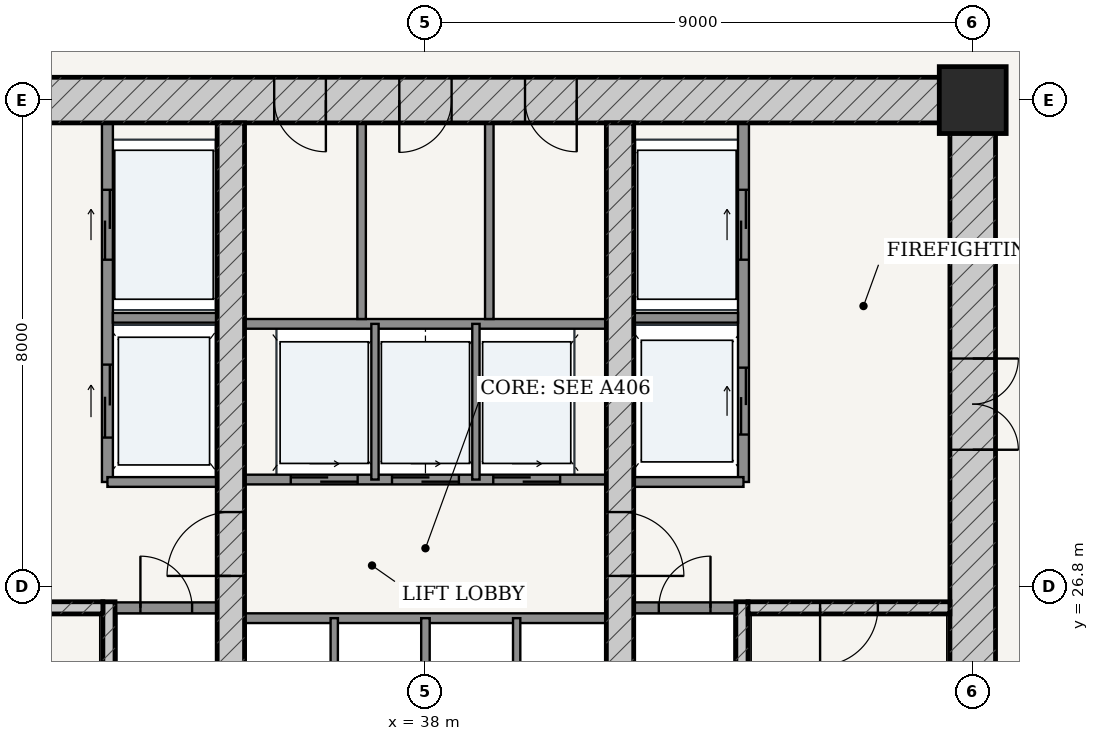
"""IFC4 building model, lengths in metres.
Left out: names, types, materials, properties, quantities, classifications, styles, units other than length and angle.
Written with IfcOpenShell. Run it as: python <this file> out.ifc"""

import sys

from ifc_helpers import new_model, si_unit, direction, frame, frame_2d, origin, origin_2d, place, context, subcontext, project, spatial, rectangle, extrude, source, transform, mapped, element, fill, save


model = new_model("IFC4")
c1 = context("Model", 3, precision=1e-05, world=origin(), true_north=direction((-0.2419218956, 0.970295726276)))
c2 = subcontext(c1, "Body", "Model", "MODEL_VIEW")
j1 = project(units=[si_unit("LENGTHUNIT", "METRE"), si_unit("PLANEANGLEUNIT", "RADIAN")], contexts=[c1])
p1 = place(None, origin())
s1 = spatial("IfcSite", under=j1, at=p1, CompositionType="ELEMENT")
p2 = place(p1, origin())
s2 = spatial("IfcBuilding", under=s1, at=p2, CompositionType="ELEMENT")
p3 = place(p2, frame((0.0, 0.0, 14.4)))
s3 = spatial("IfcBuildingStorey", under=s2, at=p3, CompositionType="ELEMENT", Elevation=14.4)
p4 = place(p3, frame((47.0, 34.8, 0.0), z_axis=(0.0, 0.0, 1.0), x_axis=(1.0, 0.0, 0.0)))
e1 = element("IfcColumn", 1, at=p4, inside=s3, PredefinedType="COLUMN", context=c2, shape_type="SweptSolid", body=[
    extrude(rectangle(XDim=1.1, YDim=1.1, at=origin_2d()), origin(), (0.0, 0.0, 1.0), 4.5),
])
p5 = place(p3, frame((28.625, 34.8, 0.0), z_axis=(0.0, 0.0, 1.0), x_axis=(1.0, 0.0, 0.0)))
e2 = element("IfcWall", 2, at=p5, inside=s3, PredefinedType="SHEAR", context=c2, shape_type="SweptSolid", body=[
    extrude(rectangle(XDim=18.75, YDim=0.75, at=frame_2d((9.375, 0.0))), origin(), (0.0, 0.0, 1.0), 4.05),
])
p6 = place(p5, frame((6.887, 0.0, 0.0)))
e3 = element("IfcOpeningElement", 3, at=p6, cuts=e2, PredefinedType="OPENING", context=c2, shape_type="SweptSolid", body=[
    extrude(rectangle(XDim=0.85, YDim=2.1, at=frame_2d((0.425, 1.05))), frame((0.0, 0.385, 0.0), z_axis=(0.0, -1.0, 0.0), x_axis=(1.0, 0.0, 0.0)), (0.0, 0.0, 1.0), 0.77),
])
p7 = place(p5, frame((8.945, 0.0, 0.0)))
e4 = element("IfcOpeningElement", 4, at=p7, cuts=e2, PredefinedType="OPENING", context=c2, shape_type="SweptSolid", body=[
    extrude(rectangle(XDim=0.86, YDim=2.1, at=frame_2d((0.43, 1.05))), frame((0.0, 0.385, 0.0), z_axis=(0.0, -1.0, 0.0), x_axis=(1.0, 0.0, 0.0)), (0.0, 0.0, 1.0), 0.77),
])
p8 = place(p5, frame((11.012, 0.0, 0.0)))
e5 = element("IfcOpeningElement", 5, at=p8, cuts=e2, PredefinedType="OPENING", context=c2, shape_type="SweptSolid", body=[
    extrude(rectangle(XDim=0.85, YDim=2.1, at=frame_2d((0.425, 1.05))), frame((0.0, 0.385, 0.0), z_axis=(0.0, -1.0, 0.0), x_axis=(1.0, 0.0, 0.0)), (0.0, 0.0, 1.0), 0.77),
])
p9 = place(p3, frame((47.0, 19.175, 0.0), z_axis=(0.0, 0.0, 1.0), x_axis=(0.0, 1.0, 0.0)))
e6 = element("IfcWall", 6, at=p9, inside=s3, PredefinedType="SHEAR", context=c2, shape_type="SweptSolid", body=[
    extrude(rectangle(XDim=15.25, YDim=0.75, at=frame_2d((7.625, 0.0))), origin(), (0.0, 0.0, 1.0), 4.05),
])
p10 = place(p9, frame((9.875, 0.0, 0.0)))
e7 = element("IfcOpeningElement", 7, at=p10, cuts=e6, PredefinedType="OPENING", context=c2, shape_type="SweptSolid", body=[
    extrude(rectangle(XDim=1.5, YDim=2.2, at=frame_2d((0.75, 1.1))), frame((0.0, 0.385, 0.0), z_axis=(0.0, -1.0, 0.0), x_axis=(1.0, 0.0, 0.0)), (0.0, 0.0, 1.0), 0.77),
])
p11 = place(p3, frame((32.795, 19.175, 0.0), z_axis=(0.0, 0.0, 1.0), x_axis=(0.0, 1.0, 0.0)))
e8 = element("IfcWall", 8, at=p11, inside=s3, PredefinedType="SOLIDWALL", context=c2, shape_type="SweptSolid", body=[
    extrude(rectangle(XDim=7.375, YDim=0.2, at=frame_2d((3.688, 0.0))), origin(), (0.0, 0.0, 1.0), 4.05),
])
p12 = place(p3, frame((29.375, 26.45, 0.0), z_axis=(0.0, 0.0, 1.0), x_axis=(1.0, 0.0, 0.0)))
e9 = element("IfcWall", 9, at=p12, inside=s3, PredefinedType="SOLIDWALL", context=c2, shape_type="SweptSolid", body=[
    extrude(rectangle(XDim=3.32, YDim=0.2, at=frame_2d((1.66, 0.0))), origin(), (0.0, 0.0, 1.0), 4.05),
])
p13 = place(p12, frame((1.185, 0.0, 0.0)))
e10 = element("IfcOpeningElement", 10, at=p13, cuts=e9, PredefinedType="OPENING", context=c2, shape_type="SweptSolid", body=[
    extrude(rectangle(XDim=0.95, YDim=2.15, at=frame_2d((0.475, 1.075))), frame((0.0, 0.11, 0.0), z_axis=(0.0, -1.0, 0.0), x_axis=(1.0, 0.0, 0.0)), (0.0, 0.0, 1.0), 0.22),
])
p14 = place(p3, frame((43.205, 19.175, 0.0), z_axis=(0.0, 0.0, 1.0), x_axis=(0.0, 1.0, 0.0)))
e11 = element("IfcWall", 11, at=p14, inside=s3, PredefinedType="SOLIDWALL", context=c2, shape_type="SweptSolid", body=[
    extrude(rectangle(XDim=7.375, YDim=0.2, at=frame_2d((3.688, 0.0))), origin(), (0.0, 0.0, 1.0), 4.05),
])
p15 = place(p3, frame((43.305, 26.45, 0.0), z_axis=(0.0, 0.0, 1.0), x_axis=(1.0, 0.0, 0.0)))
e12 = element("IfcWall", 12, at=p15, inside=s3, PredefinedType="SOLIDWALL", context=c2, shape_type="SweptSolid", body=[
    extrude(rectangle(XDim=3.32, YDim=0.2, at=frame_2d((1.66, 0.0))), origin(), (0.0, 0.0, 1.0), 4.05),
])
p16 = place(p15, frame((1.185, 0.0, 0.0)))
e13 = element("IfcOpeningElement", 13, at=p16, cuts=e12, PredefinedType="OPENING", context=c2, shape_type="SweptSolid", body=[
    extrude(rectangle(XDim=0.95, YDim=2.15, at=frame_2d((0.475, 1.075))), frame((0.0, 0.11, 0.0), z_axis=(0.0, -1.0, 0.0), x_axis=(1.0, 0.0, 0.0)), (0.0, 0.0, 1.0), 0.22),
])
p17 = place(p3, frame((34.8, 19.175, 0.0), z_axis=(0.0, 0.0, 1.0), x_axis=(0.0, 1.0, 0.0)))
e14 = element("IfcWall", 14, at=p17, inside=s3, PredefinedType="SHEAR", context=c2, shape_type="SweptSolid", body=[
    extrude(rectangle(XDim=15.25, YDim=0.45, at=frame_2d((7.625, 0.0))), origin(), (0.0, 0.0, 1.0), 4.05),
])
p18 = place(p17, frame((7.8, 0.0, 0.0)))
e15 = element("IfcOpeningElement", 15, at=p18, cuts=e14, PredefinedType="OPENING", context=c2, shape_type="SweptSolid", body=[
    extrude(rectangle(XDim=1.05, YDim=2.15, at=frame_2d((0.525, 1.075))), frame((0.0, 0.235, 0.0), z_axis=(0.0, -1.0, 0.0), x_axis=(1.0, 0.0, 0.0)), (0.0, 0.0, 1.0), 0.47),
])
p19 = place(p3, frame((41.2, 19.175, 0.0), z_axis=(0.0, 0.0, 1.0), x_axis=(0.0, 1.0, 0.0)))
e16 = element("IfcWall", 16, at=p19, inside=s3, PredefinedType="SHEAR", context=c2, shape_type="SweptSolid", body=[
    extrude(rectangle(XDim=15.25, YDim=0.45, at=frame_2d((7.625, 0.0))), origin(), (0.0, 0.0, 1.0), 4.05),
])
p20 = place(p19, frame((7.8, 0.0, 0.0)))
e17 = element("IfcOpeningElement", 17, at=p20, cuts=e16, PredefinedType="OPENING", context=c2, shape_type="SweptSolid", body=[
    extrude(rectangle(XDim=1.05, YDim=2.15, at=frame_2d((0.525, 1.075))), frame((0.0, 0.235, 0.0), z_axis=(0.0, -1.0, 0.0), x_axis=(1.0, 0.0, 0.0)), (0.0, 0.0, 1.0), 0.47),
])
p21 = place(p3, frame((32.9, 26.45, 0.0), z_axis=(0.0, 0.0, 1.0), x_axis=(1.0, 0.0, 0.0)))
e18 = element("IfcWall", 18, at=p21, inside=s3, PredefinedType="PARTITIONING", context=c2, shape_type="SweptSolid", body=[
    extrude(rectangle(XDim=1.675, YDim=0.18, at=frame_2d((0.837, 0.0))), origin(), (0.0, 0.0, 1.0), 4.05),
])
p22 = place(p21, frame((0.413, 0.0, 0.0)))
e19 = element("IfcOpeningElement", 19, at=p22, cuts=e18, PredefinedType="OPENING", context=c2, shape_type="SweptSolid", body=[
    extrude(rectangle(XDim=0.85, YDim=2.1, at=frame_2d((0.425, 1.05))), frame((0.0, 0.1, 0.0), z_axis=(0.0, -1.0, 0.0), x_axis=(1.0, 0.0, 0.0)), (0.0, 0.0, 1.0), 0.2),
])
p23 = place(p3, frame((41.425, 26.45, 0.0), z_axis=(0.0, 0.0, 1.0), x_axis=(1.0, 0.0, 0.0)))
e20 = element("IfcWall", 20, at=p23, inside=s3, PredefinedType="PARTITIONING", context=c2, shape_type="SweptSolid", body=[
    extrude(rectangle(XDim=1.675, YDim=0.18, at=frame_2d((0.837, 0.0))), origin(), (0.0, 0.0, 1.0), 4.05),
])
p24 = place(p23, frame((0.413, 0.0, 0.0)))
e21 = element("IfcOpeningElement", 21, at=p24, cuts=e20, PredefinedType="OPENING", context=c2, shape_type="SweptSolid", body=[
    extrude(rectangle(XDim=0.85, YDim=2.1, at=frame_2d((0.425, 1.05))), frame((0.0, 0.1, 0.0), z_axis=(0.0, -1.0, 0.0), x_axis=(1.0, 0.0, 0.0)), (0.0, 0.0, 1.0), 0.2),
])
p25 = place(p3, frame((32.77, 28.52, 0.0), z_axis=(0.0, 0.0, 1.0), x_axis=(0.0, 1.0, 0.0)))
e22 = element("IfcWall", 22, at=p25, inside=s3, PredefinedType="PARTITIONING", context=c2, shape_type="SweptSolid", body=[
    extrude(rectangle(XDim=5.905, YDim=0.18, at=frame_2d((2.953, 0.0))), origin(), (0.0, 0.0, 1.0), 4.05),
])
p26 = place(p25, frame((3.655, 0.0, 0.0)))
e23 = element("IfcOpeningElement", 23, at=p26, cuts=e22, PredefinedType="OPENING", context=c2, shape_type="SweptSolid", body=[
    extrude(rectangle(XDim=1.15, YDim=2.2, at=frame_2d((0.575, 1.1))), frame((0.0, 0.1, 0.0), z_axis=(0.0, -1.0, 0.0), x_axis=(1.0, 0.0, 0.0)), (0.0, 0.0, 1.0), 0.2),
])
p27 = place(p25, frame((0.73, 0.0, 0.0)))
e24 = element("IfcOpeningElement", 24, at=p27, cuts=e22, PredefinedType="OPENING", context=c2, shape_type="SweptSolid", body=[
    extrude(rectangle(XDim=1.2, YDim=2.25, at=frame_2d((0.6, 1.125))), frame((0.0, 0.1, 0.0), z_axis=(0.0, -1.0, 0.0), x_axis=(1.0, 0.0, 0.0)), (0.0, 0.0, 1.0), 0.2),
])
p28 = place(p3, frame((32.86, 31.22, 0.0), z_axis=(0.0, 0.0, 1.0), x_axis=(1.0, 0.0, 0.0)))
e25 = element("IfcWall", 25, at=p28, inside=s3, PredefinedType="PARTITIONING", context=c2, shape_type="SweptSolid", body=[
    extrude(rectangle(XDim=1.715, YDim=0.16, at=frame_2d((0.857, 0.0))), origin(), (0.0, 0.0, 1.0), 4.05),
])
p29 = place(p3, frame((32.77, 28.52, 0.0), z_axis=(0.0, 0.0, 1.0), x_axis=(1.0, 0.0, 0.0)))
e26 = element("IfcWall", 26, at=p29, inside=s3, PredefinedType="PARTITIONING", context=c2, shape_type="SweptSolid", body=[
    extrude(rectangle(XDim=1.805, YDim=0.16, at=frame_2d((0.902, 0.0))), origin(), (0.0, 0.0, 1.0), 4.05),
])
p30 = place(p3, frame((43.23, 28.52, 0.0), z_axis=(0.0, 0.0, 1.0), x_axis=(0.0, 1.0, 0.0)))
e27 = element("IfcWall", 27, at=p30, inside=s3, PredefinedType="PARTITIONING", context=c2, shape_type="SweptSolid", body=[
    extrude(rectangle(XDim=5.905, YDim=0.18, at=frame_2d((2.953, 0.0))), origin(), (0.0, 0.0, 1.0), 4.05),
])
p31 = place(p30, frame((3.655, 0.0, 0.0)))
e28 = element("IfcOpeningElement", 28, at=p31, cuts=e27, PredefinedType="OPENING", context=c2, shape_type="SweptSolid", body=[
    extrude(rectangle(XDim=1.15, YDim=2.2, at=frame_2d((0.575, 1.1))), frame((0.0, 0.1, 0.0), z_axis=(0.0, -1.0, 0.0), x_axis=(1.0, 0.0, 0.0)), (0.0, 0.0, 1.0), 0.2),
])
p32 = place(p30, frame((0.78, 0.0, 0.0)))
e29 = element("IfcOpeningElement", 29, at=p32, cuts=e27, PredefinedType="OPENING", context=c2, shape_type="SweptSolid", body=[
    extrude(rectangle(XDim=1.1, YDim=2.2, at=frame_2d((0.55, 1.1))), frame((0.0, 0.1, 0.0), z_axis=(0.0, -1.0, 0.0), x_axis=(1.0, 0.0, 0.0)), (0.0, 0.0, 1.0), 0.2),
])
p33 = place(p3, frame((41.425, 31.22, 0.0), z_axis=(0.0, 0.0, 1.0), x_axis=(1.0, 0.0, 0.0)))
e30 = element("IfcWall", 30, at=p33, inside=s3, PredefinedType="PARTITIONING", context=c2, shape_type="SweptSolid", body=[
    extrude(rectangle(XDim=1.715, YDim=0.16, at=frame_2d((0.857, 0.0))), origin(), (0.0, 0.0, 1.0), 4.05),
])
p34 = place(p3, frame((41.425, 28.52, 0.0), z_axis=(0.0, 0.0, 1.0), x_axis=(1.0, 0.0, 0.0)))
e31 = element("IfcWall", 31, at=p34, inside=s3, PredefinedType="PARTITIONING", context=c2, shape_type="SweptSolid", body=[
    extrude(rectangle(XDim=1.805, YDim=0.16, at=frame_2d((0.902, 0.0))), origin(), (0.0, 0.0, 1.0), 4.05),
])
p35 = place(p3, frame((35.025, 28.56, 0.0), z_axis=(0.0, 0.0, 1.0), x_axis=(1.0, 0.0, 0.0)))
e32 = element("IfcWall", 32, at=p35, inside=s3, PredefinedType="PARTITIONING", context=c2, shape_type="SweptSolid", body=[
    extrude(rectangle(XDim=5.95, YDim=0.16, at=frame_2d((2.975, 0.0))), origin(), (0.0, 0.0, 1.0), 4.05),
])
p36 = place(p35, frame((0.76, 0.0, 0.0)))
e33 = element("IfcOpeningElement", 33, at=p36, cuts=e32, PredefinedType="OPENING", context=c2, shape_type="SweptSolid", body=[
    extrude(rectangle(XDim=1.1, YDim=2.2, at=frame_2d((0.55, 1.1))), frame((0.0, 0.09, 0.0), z_axis=(0.0, -1.0, 0.0), x_axis=(1.0, 0.0, 0.0)), (0.0, 0.0, 1.0), 0.18),
])
p37 = place(p35, frame((2.425, 0.0, 0.0)))
e34 = element("IfcOpeningElement", 34, at=p37, cuts=e32, PredefinedType="OPENING", context=c2, shape_type="SweptSolid", body=[
    extrude(rectangle(XDim=1.1, YDim=2.2, at=frame_2d((0.55, 1.1))), frame((0.0, 0.09, 0.0), z_axis=(0.0, -1.0, 0.0), x_axis=(1.0, 0.0, 0.0)), (0.0, 0.0, 1.0), 0.18),
])
p38 = place(p35, frame((4.09, 0.0, 0.0)))
e35 = element("IfcOpeningElement", 35, at=p38, cuts=e32, PredefinedType="OPENING", context=c2, shape_type="SweptSolid", body=[
    extrude(rectangle(XDim=1.1, YDim=2.2, at=frame_2d((0.55, 1.1))), frame((0.0, 0.09, 0.0), z_axis=(0.0, -1.0, 0.0), x_axis=(1.0, 0.0, 0.0)), (0.0, 0.0, 1.0), 0.18),
])
p39 = place(p3, frame((35.025, 31.12, 0.0), z_axis=(0.0, 0.0, 1.0), x_axis=(1.0, 0.0, 0.0)))
e36 = element("IfcWall", 36, at=p39, inside=s3, PredefinedType="PARTITIONING", context=c2, shape_type="SweptSolid", body=[
    extrude(rectangle(XDim=5.95, YDim=0.16, at=frame_2d((2.975, 0.0))), origin(), (0.0, 0.0, 1.0), 4.05),
])
for number, where, z_axis, x_axis in (
    (37, (37.17, 28.56, 0.0), (0.0, 0.0, 1.0), (0.0, 1.0, 0.0)),
    (38, (38.83, 28.56, 0.0), (0.0, 0.0, 1.0), (0.0, 1.0, 0.0)),
):
    element("IfcWall", number, at=place(p3, frame(where, z_axis=z_axis, x_axis=x_axis)), inside=s3, PredefinedType="PARTITIONING", context=c2, shape_type="SweptSolid", body=[
        extrude(rectangle(XDim=2.56, YDim=0.12, at=frame_2d((1.28, 0.0))), origin(), (0.0, 0.0, 1.0), 4.05),
    ])
for number, where, z_axis, x_axis in (
    (39, (36.95, 31.2, 0.0), (0.0, 0.0, 1.0), (0.0, 1.0, 0.0)),
    (40, (39.05, 31.2, 0.0), (0.0, 0.0, 1.0), (0.0, 1.0, 0.0)),
):
    element("IfcWall", number, at=place(p3, frame(where, z_axis=z_axis, x_axis=x_axis)), inside=s3, PredefinedType="PARTITIONING", context=c2, shape_type="SweptSolid", body=[
        extrude(rectangle(XDim=3.225, YDim=0.14, at=frame_2d((1.613, 0.0))), origin(), (0.0, 0.0, 1.0), 4.05),
    ])
p40 = place(p3, frame((35.025, 26.28, 0.0), z_axis=(0.0, 0.0, 1.0), x_axis=(1.0, 0.0, 0.0)))
e41 = element("IfcWall", 41, at=p40, inside=s3, PredefinedType="PARTITIONING", context=c2, shape_type="SweptSolid", body=[
    extrude(rectangle(XDim=5.95, YDim=0.16, at=frame_2d((2.975, 0.0))), origin(), (0.0, 0.0, 1.0), 4.05),
])
p41 = place(p3, frame((36.5, 23.72, 0.0), z_axis=(0.0, 0.0, 1.0), x_axis=(0.0, 1.0, 0.0)))
e42 = element("IfcWall", 42, at=p41, inside=s3, PredefinedType="PARTITIONING", context=c2, shape_type="SweptSolid", body=[
    extrude(rectangle(XDim=2.56, YDim=0.12, at=frame_2d((1.28, 0.0))), origin(), (0.0, 0.0, 1.0), 4.05),
])
p42 = place(p3, frame((38.0, 23.72, 0.0), z_axis=(0.0, 0.0, 1.0), x_axis=(0.0, 1.0, 0.0)))
e43 = element("IfcWall", 43, at=p42, inside=s3, PredefinedType="PARTITIONING", context=c2, shape_type="SweptSolid", body=[
    extrude(rectangle(XDim=2.56, YDim=0.14, at=frame_2d((1.28, 0.0))), origin(), (0.0, 0.0, 1.0), 4.05),
])
p43 = place(p3, frame((39.5, 23.72, 0.0), z_axis=(0.0, 0.0, 1.0), x_axis=(0.0, 1.0, 0.0)))
e44 = element("IfcWall", 44, at=p43, inside=s3, PredefinedType="PARTITIONING", context=c2, shape_type="SweptSolid", body=[
    extrude(rectangle(XDim=2.56, YDim=0.12, at=frame_2d((1.28, 0.0))), origin(), (0.0, 0.0, 1.0), 4.05),
])
m1 = source(origin(), c2, "Body", "SweptSolid", [
    extrude(rectangle(XDim=1.5, YDim=2.2, at=frame_2d((0.75, 1.1))), frame((0.0, 0.025, 0.0), z_axis=(0.0, -1.0, 0.0), x_axis=(1.0, 0.0, 0.0)), (0.0, 0.0, 1.0), 0.05),
])
p44 = place(p10, frame((1.5, 0.0, 0.0), z_axis=(0.0, 0.0, 1.0), x_axis=(-1.0, 0.0, 0.0)))
e45 = element("IfcDoor", 45, at=p44, inside=s3, OperationType="DOUBLE_DOOR_SINGLE_SWING", PredefinedType="DOOR", context=c2, shape_type="MappedRepresentation", body=[
    mapped(m1, transform((0.0, 0.0, 0.0), scale=1.0)),
])
fill(e7, e45)
m2 = source(origin(), c2, "Body", "SweptSolid", [
    extrude(rectangle(XDim=1.05, YDim=2.15, at=frame_2d((0.525, 1.075))), frame((0.0, 0.025, 0.0), z_axis=(0.0, -1.0, 0.0), x_axis=(1.0, 0.0, 0.0)), (0.0, 0.0, 1.0), 0.05),
])
p45 = place(p18, origin())
e46 = element("IfcDoor", 46, at=p45, inside=s3, OperationType="SINGLE_SWING_LEFT", PredefinedType="DOOR", context=c2, shape_type="MappedRepresentation", body=[
    mapped(m2, transform((0.0, 0.0, 0.0), scale=1.0)),
])
fill(e15, e46)
p46 = place(p20, frame((1.05, 0.0, 0.0), z_axis=(0.0, 0.0, 1.0), x_axis=(-1.0, 0.0, 0.0)))
e47 = element("IfcDoor", 47, at=p46, inside=s3, OperationType="SINGLE_SWING_RIGHT", PredefinedType="DOOR", context=c2, shape_type="MappedRepresentation", body=[
    mapped(m2, transform((0.0, 0.0, 0.0), scale=1.0)),
])
fill(e17, e47)
m3 = source(origin(), c2, "Body", "SweptSolid", [
    extrude(rectangle(XDim=0.95, YDim=2.15, at=frame_2d((0.475, 1.075))), frame((0.0, 0.025, 0.0), z_axis=(0.0, -1.0, 0.0), x_axis=(1.0, 0.0, 0.0)), (0.0, 0.0, 1.0), 0.05),
])
p47 = place(p16, frame((0.95, 0.0, 0.0), z_axis=(0.0, 0.0, 1.0), x_axis=(-1.0, 0.0, 0.0)))
e48 = element("IfcDoor", 48, at=p47, inside=s3, OperationType="SINGLE_SWING_RIGHT", PredefinedType="DOOR", context=c2, shape_type="MappedRepresentation", body=[
    mapped(m3, transform((0.0, 0.0, 0.0), scale=1.0)),
])
fill(e13, e48)
m4 = source(origin(), c2, "Body", "SweptSolid", [
    extrude(rectangle(XDim=0.85, YDim=2.1, at=frame_2d((0.425, 1.05))), frame((0.0, 0.025, 0.0), z_axis=(0.0, -1.0, 0.0), x_axis=(1.0, 0.0, 0.0)), (0.0, 0.0, 1.0), 0.05),
])
p48 = place(p22, origin())
e49 = element("IfcDoor", 49, at=p48, inside=s3, OperationType="SINGLE_SWING_LEFT", PredefinedType="DOOR", context=c2, shape_type="MappedRepresentation", body=[
    mapped(m4, transform((0.0, 0.0, 0.0), scale=1.0)),
])
fill(e19, e49)
p49 = place(p24, origin())
e50 = element("IfcDoor", 50, at=p49, inside=s3, OperationType="SINGLE_SWING_RIGHT", PredefinedType="DOOR", context=c2, shape_type="MappedRepresentation", body=[
    mapped(m4, transform((0.0, 0.0, 0.0), scale=1.0)),
])
fill(e21, e50)
p50 = place(p6, frame((0.85, 0.0, 0.0), z_axis=(0.0, 0.0, 1.0), x_axis=(-1.0, 0.0, 0.0)))
e51 = element("IfcDoor", 51, at=p50, inside=s3, OperationType="SINGLE_SWING_LEFT", PredefinedType="DOOR", context=c2, shape_type="MappedRepresentation", body=[
    mapped(m4, transform((0.0, 0.0, 0.0), scale=1.0)),
])
fill(e3, e51)
m5 = source(origin(), c2, "Body", "SweptSolid", [
    extrude(rectangle(XDim=0.86, YDim=2.1, at=frame_2d((0.43, 1.05))), frame((0.0, 0.025, 0.0), z_axis=(0.0, -1.0, 0.0), x_axis=(1.0, 0.0, 0.0)), (0.0, 0.0, 1.0), 0.05),
])
p51 = place(p7, frame((0.86, 0.0, 0.0), z_axis=(0.0, 0.0, 1.0), x_axis=(-1.0, 0.0, 0.0)))
e52 = element("IfcDoor", 52, at=p51, inside=s3, OperationType="SINGLE_SWING_RIGHT", PredefinedType="DOOR", context=c2, shape_type="MappedRepresentation", body=[
    mapped(m5, transform((0.0, 0.0, 0.0), scale=1.0)),
])
fill(e4, e52)
p52 = place(p8, frame((0.85, 0.0, 0.0), z_axis=(0.0, 0.0, 1.0), x_axis=(-1.0, 0.0, 0.0)))
e53 = element("IfcDoor", 53, at=p52, inside=s3, OperationType="SINGLE_SWING_LEFT", PredefinedType="DOOR", context=c2, shape_type="MappedRepresentation", body=[
    mapped(m4, transform((0.0, 0.0, 0.0), scale=1.0)),
])
fill(e5, e53)
m6 = source(origin(), c2, "Body", "SweptSolid", [
    extrude(rectangle(XDim=1.15, YDim=2.2, at=frame_2d((0.575, 1.1))), frame((0.0, 0.025, 0.0), z_axis=(0.0, -1.0, 0.0), x_axis=(1.0, 0.0, 0.0)), (0.0, 0.0, 1.0), 0.05),
])
p53 = place(p26, origin())
e54 = element("IfcDoor", 54, at=p53, inside=s3, OperationType="DOUBLE_DOOR_SLIDING", PredefinedType="DOOR", context=c2, shape_type="MappedRepresentation", body=[
    mapped(m6, transform((0.0, 0.0, 0.0), scale=1.0)),
])
fill(e23, e54)
p54 = place(p31, origin())
e55 = element("IfcDoor", 55, at=p54, inside=s3, OperationType="DOUBLE_DOOR_SLIDING", PredefinedType="DOOR", context=c2, shape_type="MappedRepresentation", body=[
    mapped(m6, transform((0.0, 0.0, 0.0), scale=1.0)),
])
fill(e28, e55)
m7 = source(origin(), c2, "Body", "SweptSolid", [
    extrude(rectangle(XDim=1.2, YDim=2.25, at=frame_2d((0.6, 1.125))), frame((0.0, 0.025, 0.0), z_axis=(0.0, -1.0, 0.0), x_axis=(1.0, 0.0, 0.0)), (0.0, 0.0, 1.0), 0.05),
])
p55 = place(p27, origin())
e56 = element("IfcDoor", 56, at=p55, inside=s3, OperationType="DOUBLE_DOOR_SLIDING", PredefinedType="DOOR", context=c2, shape_type="MappedRepresentation", body=[
    mapped(m7, transform((0.0, 0.0, 0.0), scale=1.0)),
])
fill(e24, e56)
m8 = source(origin(), c2, "Body", "SweptSolid", [
    extrude(rectangle(XDim=1.1, YDim=2.2, at=frame_2d((0.55, 1.1))), frame((0.0, 0.025, 0.0), z_axis=(0.0, -1.0, 0.0), x_axis=(1.0, 0.0, 0.0)), (0.0, 0.0, 1.0), 0.05),
])
p56 = place(p32, origin())
e57 = element("IfcDoor", 57, at=p56, inside=s3, OperationType="DOUBLE_DOOR_SLIDING", PredefinedType="DOOR", context=c2, shape_type="MappedRepresentation", body=[
    mapped(m8, transform((0.0, 0.0, 0.0), scale=1.0)),
])
fill(e29, e57)
p57 = place(p36, origin())
e58 = element("IfcDoor", 58, at=p57, inside=s3, OperationType="DOUBLE_DOOR_SLIDING", PredefinedType="DOOR", context=c2, shape_type="MappedRepresentation", body=[
    mapped(m8, transform((0.0, 0.0, 0.0), scale=1.0)),
])
fill(e33, e58)
p58 = place(p37, origin())
e59 = element("IfcDoor", 59, at=p58, inside=s3, OperationType="DOUBLE_DOOR_SLIDING", PredefinedType="DOOR", context=c2, shape_type="MappedRepresentation", body=[
    mapped(m8, transform((0.0, 0.0, 0.0), scale=1.0)),
])
fill(e34, e59)
p59 = place(p38, origin())
e60 = element("IfcDoor", 60, at=p59, inside=s3, OperationType="DOUBLE_DOOR_SLIDING", PredefinedType="DOOR", context=c2, shape_type="MappedRepresentation", body=[
    mapped(m8, transform((0.0, 0.0, 0.0), scale=1.0)),
])
fill(e35, e60)
save(model, sys.argv[1])
